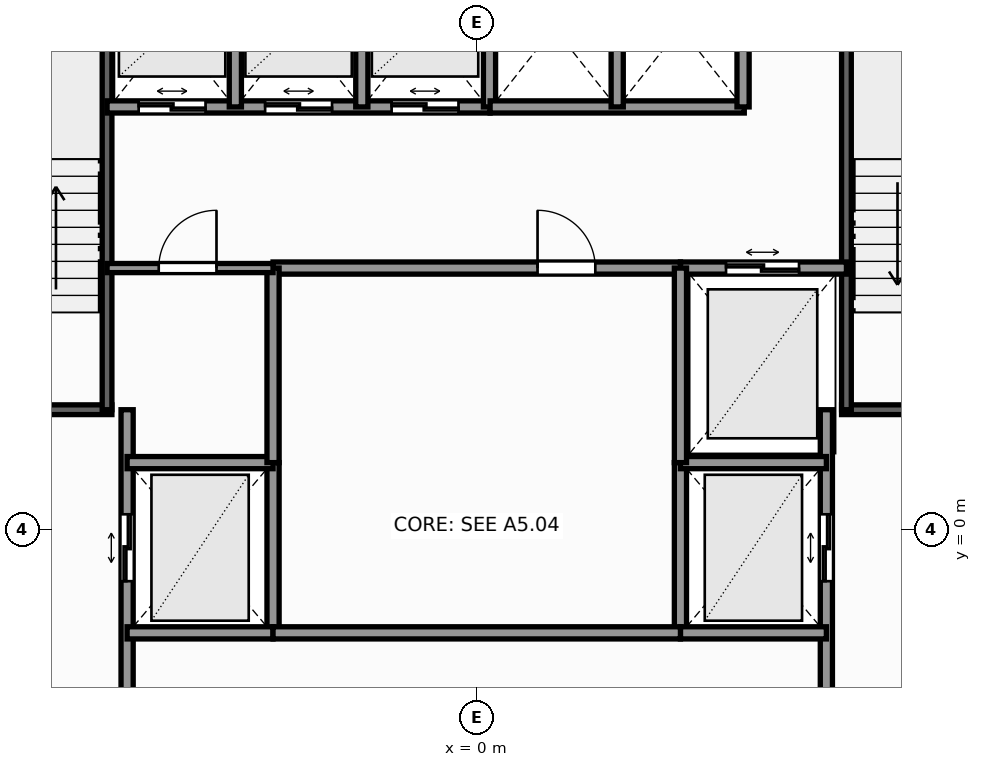
"""IFC4 building model, lengths in metres.
Left out: names, types, materials, properties, quantities, classifications, styles, units other than length and angle.
Written with IfcOpenShell. Run it as: python <this file> out.ifc"""

import sys

from ifc_helpers import new_model, si_unit, direction, frame, frame_2d, origin, place, context, subcontext, project, spatial, rectangle, extrude, element, fill, save


model = new_model("IFC4")
c1 = context("Model", 3, precision=1e-05, world=origin(), true_north=direction((0.0, 1.0)))
c2 = subcontext(c1, "Body", "Model", "MODEL_VIEW")
j1 = project(units=[si_unit("LENGTHUNIT", "METRE"), si_unit("PLANEANGLEUNIT", "RADIAN")], contexts=[c1])
p1 = place(None, origin())
s1 = spatial("IfcSite", under=j1, at=p1, CompositionType="ELEMENT")
p2 = place(p1, origin())
s2 = spatial("IfcBuilding", under=s1, at=p2, CompositionType="ELEMENT")
p3 = place(p2, frame((0.0, 0.0, 27.1)))
s3 = spatial("IfcBuildingStorey", under=s2, at=p3, CompositionType="ELEMENT", Elevation=27.1)
p4 = place(p3, frame((-9.52, 1.97, 0.0), z_axis=(0.0, 0.0, 1.0), x_axis=(1.0, 0.0, 0.0)))
e1 = element("IfcWall", 1, at=p4, inside=s3, PredefinedType="SHEAR", context=c2, shape_type="SweptSolid", body=[
    extrude(rectangle(XDim=3.52, YDim=0.16, at=frame_2d((1.76, 0.0))), origin(), (0.0, 0.0, 1.0), 3.3),
])
p5 = place(p4, frame((1.15, 0.0, 0.0)))
e2 = element("IfcOpeningElement", 2, at=p5, cuts=e1, PredefinedType="OPENING", context=c2, shape_type="SweptSolid", body=[
    extrude(rectangle(XDim=1.1, YDim=2.2, at=frame_2d((0.55, 1.1))), frame((0.0, 0.09, 0.0), z_axis=(0.0, -1.0, 0.0), x_axis=(1.0, 0.0, 0.0)), (0.0, 0.0, 1.0), 0.18),
])
p6 = place(p3, frame((-6.08, 1.97, 0.0), z_axis=(0.0, 0.0, 1.0), x_axis=(0.0, 1.0, 0.0)))
e3 = element("IfcWall", 3, at=p6, inside=s3, PredefinedType="SHEAR", context=c2, shape_type="SweptSolid", body=[
    extrude(rectangle(XDim=7.56, YDim=0.16, at=frame_2d((3.78, 0.0))), origin(), (0.0, 0.0, 1.0), 3.3),
])
p7 = place(p3, frame((6.0, 1.97, 0.0), z_axis=(0.0, 0.0, 1.0), x_axis=(1.0, 0.0, 0.0)))
e4 = element("IfcWall", 4, at=p7, inside=s3, PredefinedType="SHEAR", context=c2, shape_type="SweptSolid", body=[
    extrude(rectangle(XDim=3.52, YDim=0.16, at=frame_2d((1.76, 0.0))), origin(), (0.0, 0.0, 1.0), 3.3),
])
p8 = place(p7, frame((1.15, 0.0, 0.0)))
e5 = element("IfcOpeningElement", 5, at=p8, cuts=e4, PredefinedType="OPENING", context=c2, shape_type="SweptSolid", body=[
    extrude(rectangle(XDim=1.1, YDim=2.2, at=frame_2d((0.55, 1.1))), frame((0.0, 0.09, 0.0), z_axis=(0.0, -1.0, 0.0), x_axis=(1.0, 0.0, 0.0)), (0.0, 0.0, 1.0), 0.18),
])
p9 = place(p3, frame((6.08, 1.97, 0.0), z_axis=(0.0, 0.0, 1.0), x_axis=(0.0, 1.0, 0.0)))
e6 = element("IfcWall", 6, at=p9, inside=s3, PredefinedType="SHEAR", context=c2, shape_type="SweptSolid", body=[
    extrude(rectangle(XDim=7.56, YDim=0.16, at=frame_2d((3.78, 0.0))), origin(), (0.0, 0.0, 1.0), 3.3),
])
p10 = place(p3, frame((-5.75, -3.6, 0.0), z_axis=(0.0, 0.0, 1.0), x_axis=(0.0, 1.0, 0.0)))
e7 = element("IfcWall", 7, at=p10, inside=s3, PredefinedType="SOLIDWALL", context=c2, shape_type="SweptSolid", body=[
    extrude(rectangle(XDim=5.57, YDim=0.2, at=frame_2d((2.785, 0.0))), origin(), (0.0, 0.0, 1.0), 3.06),
])
p11 = place(p10, frame((2.75, 0.0, 0.0)))
e8 = element("IfcOpeningElement", 8, at=p11, cuts=e7, PredefinedType="OPENING", context=c2, shape_type="SweptSolid", body=[
    extrude(rectangle(XDim=1.1, YDim=2.2, at=frame_2d((0.55, 1.1))), frame((0.0, 0.11, 0.0), z_axis=(0.0, -1.0, 0.0), x_axis=(1.0, 0.0, 0.0)), (0.0, 0.0, 1.0), 0.22),
])
p12 = place(p3, frame((-3.35, -1.7, 0.0), z_axis=(0.0, 0.0, 1.0), x_axis=(0.0, 1.0, 0.0)))
e9 = element("IfcWall", 9, at=p12, inside=s3, PredefinedType="SOLIDWALL", context=c2, shape_type="SweptSolid", body=[
    extrude(rectangle(XDim=2.8, YDim=0.2, at=frame_2d((1.4, 0.0))), origin(), (0.0, 0.0, 1.0), 3.06),
])
for number, where, z_axis, x_axis in (
    (10, (-5.75, -1.7, 0.0), (0.0, 0.0, 1.0), (1.0, 0.0, 0.0)),
    (11, (-5.75, 1.1, 0.0), (0.0, 0.0, 1.0), (1.0, 0.0, 0.0)),
):
    element("IfcWall", number, at=place(p3, frame(where, z_axis=z_axis, x_axis=x_axis)), inside=s3, PredefinedType="SOLIDWALL", context=c2, shape_type="SweptSolid", body=[
        extrude(rectangle(XDim=2.4, YDim=0.2, at=frame_2d((1.2, 0.0))), origin(), (0.0, 0.0, 1.0), 3.06),
    ])
p13 = place(p3, frame((5.75, -3.6, 0.0), z_axis=(0.0, 0.0, 1.0), x_axis=(0.0, 1.0, 0.0)))
e12 = element("IfcWall", 12, at=p13, inside=s3, PredefinedType="SOLIDWALL", context=c2, shape_type="SweptSolid", body=[
    extrude(rectangle(XDim=5.57, YDim=0.2, at=frame_2d((2.785, 0.0))), origin(), (0.0, 0.0, 1.0), 3.06),
])
p14 = place(p13, frame((2.75, 0.0, 0.0)))
e13 = element("IfcOpeningElement", 13, at=p14, cuts=e12, PredefinedType="OPENING", context=c2, shape_type="SweptSolid", body=[
    extrude(rectangle(XDim=1.1, YDim=2.2, at=frame_2d((0.55, 1.1))), frame((0.0, 0.11, 0.0), z_axis=(0.0, -1.0, 0.0), x_axis=(1.0, 0.0, 0.0)), (0.0, 0.0, 1.0), 0.22),
])
p15 = place(p3, frame((3.35, -1.7, 0.0), z_axis=(0.0, 0.0, 1.0), x_axis=(0.0, 1.0, 0.0)))
e14 = element("IfcWall", 14, at=p15, inside=s3, PredefinedType="SOLIDWALL", context=c2, shape_type="SweptSolid", body=[
    extrude(rectangle(XDim=2.8, YDim=0.2, at=frame_2d((1.4, 0.0))), origin(), (0.0, 0.0, 1.0), 3.06),
])
for number, where, z_axis, x_axis in (
    (15, (3.35, -1.7, 0.0), (0.0, 0.0, 1.0), (1.0, 0.0, 0.0)),
    (16, (3.35, 1.1, 0.0), (0.0, 0.0, 1.0), (1.0, 0.0, 0.0)),
):
    element("IfcWall", number, at=place(p3, frame(where, z_axis=z_axis, x_axis=x_axis)), inside=s3, PredefinedType="SOLIDWALL", context=c2, shape_type="SweptSolid", body=[
        extrude(rectangle(XDim=2.4, YDim=0.2, at=frame_2d((1.2, 0.0))), origin(), (0.0, 0.0, 1.0), 3.06),
    ])
p16 = place(p3, frame((3.35, 4.3, 0.0), z_axis=(0.0, 0.0, 1.0), x_axis=(1.0, 0.0, 0.0)))
e17 = element("IfcWall", 17, at=p16, inside=s3, PredefinedType="SOLIDWALL", context=c2, shape_type="SweptSolid", body=[
    extrude(rectangle(XDim=2.73, YDim=0.2, at=frame_2d((1.365, 0.0))), origin(), (0.0, 0.0, 1.0), 3.06),
])
p17 = place(p16, frame((0.75, 0.0, 0.0)))
e18 = element("IfcOpeningElement", 18, at=p17, cuts=e17, PredefinedType="OPENING", context=c2, shape_type="SweptSolid", body=[
    extrude(rectangle(XDim=1.2, YDim=2.25, at=frame_2d((0.6, 1.125))), frame((0.0, 0.11, 0.0), z_axis=(0.0, -1.0, 0.0), x_axis=(1.0, 0.0, 0.0)), (0.0, 0.0, 1.0), 0.22),
])
p18 = place(p3, frame((-6.08, 6.95, 0.0), z_axis=(0.0, 0.0, 1.0), x_axis=(1.0, 0.0, 0.0)))
e19 = element("IfcWall", 19, at=p18, inside=s3, PredefinedType="SOLIDWALL", context=c2, shape_type="SweptSolid", body=[
    extrude(rectangle(XDim=6.3, YDim=0.2, at=frame_2d((3.15, 0.0))), origin(), (0.0, 0.0, 1.0), 3.06),
])
p19 = place(p18, frame((0.52, 0.0, 0.0)))
e20 = element("IfcOpeningElement", 20, at=p19, cuts=e19, PredefinedType="OPENING", context=c2, shape_type="SweptSolid", body=[
    extrude(rectangle(XDim=1.1, YDim=2.2, at=frame_2d((0.55, 1.1))), frame((0.0, 0.11, 0.0), z_axis=(0.0, -1.0, 0.0), x_axis=(1.0, 0.0, 0.0)), (0.0, 0.0, 1.0), 0.22),
])
p20 = place(p18, frame((2.6, 0.0, 0.0)))
e21 = element("IfcOpeningElement", 21, at=p20, cuts=e19, PredefinedType="OPENING", context=c2, shape_type="SweptSolid", body=[
    extrude(rectangle(XDim=1.1, YDim=2.2, at=frame_2d((0.55, 1.1))), frame((0.0, 0.11, 0.0), z_axis=(0.0, -1.0, 0.0), x_axis=(1.0, 0.0, 0.0)), (0.0, 0.0, 1.0), 0.22),
])
p21 = place(p18, frame((4.68, 0.0, 0.0)))
e22 = element("IfcOpeningElement", 22, at=p21, cuts=e19, PredefinedType="OPENING", context=c2, shape_type="SweptSolid", body=[
    extrude(rectangle(XDim=1.1, YDim=2.2, at=frame_2d((0.55, 1.1))), frame((0.0, 0.11, 0.0), z_axis=(0.0, -1.0, 0.0), x_axis=(1.0, 0.0, 0.0)), (0.0, 0.0, 1.0), 0.22),
])
for number, where, z_axis, x_axis in (
    (23, (-3.97, 6.95, 0.0), (0.0, 0.0, 1.0), (0.0, 1.0, 0.0)),
    (24, (-1.89, 6.95, 0.0), (0.0, 0.0, 1.0), (0.0, 1.0, 0.0)),
    (25, (0.21, 6.95, 0.0), (0.0, 0.0, 1.0), (0.0, 1.0, 0.0)),
):
    element("IfcWall", number, at=place(p3, frame(where, z_axis=z_axis, x_axis=x_axis)), inside=s3, PredefinedType="SOLIDWALL", context=c2, shape_type="SweptSolid", body=[
        extrude(rectangle(XDim=2.57, YDim=0.2, at=frame_2d((1.285, 0.0))), origin(), (0.0, 0.0, 1.0), 3.06),
    ])
p22 = place(p3, frame((0.22, 6.95, 0.0), z_axis=(0.0, 0.0, 1.0), x_axis=(1.0, 0.0, 0.0)))
e26 = element("IfcWall", 26, at=p22, inside=s3, PredefinedType="SOLIDWALL", context=c2, shape_type="SweptSolid", body=[
    extrude(rectangle(XDim=4.18, YDim=0.2, at=frame_2d((2.09, 0.0))), origin(), (0.0, 0.0, 1.0), 3.06),
])
for number, where, z_axis, x_axis in (
    (27, (4.38, 6.95, 0.0), (0.0, 0.0, 1.0), (0.0, 1.0, 0.0)),
    (28, (2.31, 6.95, 0.0), (0.0, 0.0, 1.0), (0.0, 1.0, 0.0)),
):
    element("IfcWall", number, at=place(p3, frame(where, z_axis=z_axis, x_axis=x_axis)), inside=s3, PredefinedType="SOLIDWALL", context=c2, shape_type="SweptSolid", body=[
        extrude(rectangle(XDim=2.57, YDim=0.2, at=frame_2d((1.285, 0.0))), origin(), (0.0, 0.0, 1.0), 3.06),
    ])
p23 = place(p3, frame((-3.35, 4.3, 0.0), z_axis=(0.0, 0.0, 1.0), x_axis=(1.0, 0.0, 0.0)))
e29 = element("IfcWall", 29, at=p23, inside=s3, PredefinedType="SOLIDWALL", context=c2, shape_type="SweptSolid", body=[
    extrude(rectangle(XDim=6.7, YDim=0.2, at=frame_2d((3.35, 0.0))), origin(), (0.0, 0.0, 1.0), 3.06),
])
p24 = place(p23, frame((4.35, 0.0, 0.0)))
e30 = element("IfcOpeningElement", 30, at=p24, cuts=e29, PredefinedType="OPENING", context=c2, shape_type="SweptSolid", body=[
    extrude(rectangle(XDim=0.95, YDim=2.06, at=frame_2d((0.475, 1.03))), frame((0.0, 0.11, 0.0), z_axis=(0.0, -1.0, 0.0), x_axis=(1.0, 0.0, 0.0)), (0.0, 0.0, 1.0), 0.22),
])
p25 = place(p3, frame((-3.35, -1.7, 0.0), z_axis=(0.0, 0.0, 1.0), x_axis=(1.0, 0.0, 0.0)))
e31 = element("IfcWall", 31, at=p25, inside=s3, PredefinedType="SOLIDWALL", context=c2, shape_type="SweptSolid", body=[
    extrude(rectangle(XDim=6.7, YDim=0.2, at=frame_2d((3.35, 0.0))), origin(), (0.0, 0.0, 1.0), 3.06),
])
for number, where, z_axis, x_axis in (
    (32, (-3.35, 1.1, 0.0), (0.0, 0.0, 1.0), (0.0, 1.0, 0.0)),
    (33, (3.35, 1.1, 0.0), (0.0, 0.0, 1.0), (0.0, 1.0, 0.0)),
):
    element("IfcWall", number, at=place(p3, frame(where, z_axis=z_axis, x_axis=x_axis)), inside=s3, PredefinedType="SOLIDWALL", context=c2, shape_type="SweptSolid", body=[
        extrude(rectangle(XDim=3.2, YDim=0.2, at=frame_2d((1.6, 0.0))), origin(), (0.0, 0.0, 1.0), 3.06),
    ])
p26 = place(p3, frame((-6.08, 4.3, 0.0), z_axis=(0.0, 0.0, 1.0), x_axis=(1.0, 0.0, 0.0)))
e34 = element("IfcWall", 34, at=p26, inside=s3, PredefinedType="PARTITIONING", context=c2, shape_type="SweptSolid", body=[
    extrude(rectangle(XDim=2.73, YDim=0.15, at=frame_2d((1.365, 0.0))), origin(), (0.0, 0.0, 1.0), 3.06),
])
p27 = place(p26, frame((0.85, 0.0, 0.0)))
e35 = element("IfcOpeningElement", 35, at=p27, cuts=e34, PredefinedType="OPENING", context=c2, shape_type="SweptSolid", body=[
    extrude(rectangle(XDim=0.95, YDim=2.06, at=frame_2d((0.475, 1.03))), frame((0.0, 0.085, 0.0), z_axis=(0.0, -1.0, 0.0), x_axis=(1.0, 0.0, 0.0)), (0.0, 0.0, 1.0), 0.17),
])
p28 = place(p11, origin())
e36 = element("IfcDoor", 36, at=p28, inside=s3, OperationType="DOUBLE_DOOR_SLIDING", PredefinedType="DOOR", context=c2, shape_type="SweptSolid", body=[
    extrude(rectangle(XDim=1.1, YDim=2.2, at=frame_2d((0.55, 1.1))), frame((0.0, 0.025, 0.0), z_axis=(0.0, -1.0, 0.0), x_axis=(1.0, 0.0, 0.0)), (0.0, 0.0, 1.0), 0.05),
])
fill(e8, e36)
p29 = place(p14, origin())
e37 = element("IfcDoor", 37, at=p29, inside=s3, OperationType="DOUBLE_DOOR_SLIDING", PredefinedType="DOOR", context=c2, shape_type="SweptSolid", body=[
    extrude(rectangle(XDim=1.1, YDim=2.2, at=frame_2d((0.55, 1.1))), frame((0.0, 0.025, 0.0), z_axis=(0.0, -1.0, 0.0), x_axis=(1.0, 0.0, 0.0)), (0.0, 0.0, 1.0), 0.05),
])
fill(e13, e37)
p30 = place(p17, origin())
e38 = element("IfcDoor", 38, at=p30, inside=s3, OperationType="DOUBLE_DOOR_SLIDING", PredefinedType="DOOR", context=c2, shape_type="SweptSolid", body=[
    extrude(rectangle(XDim=1.2, YDim=2.25, at=frame_2d((0.6, 1.125))), frame((0.0, 0.025, 0.0), z_axis=(0.0, -1.0, 0.0), x_axis=(1.0, 0.0, 0.0)), (0.0, 0.0, 1.0), 0.05),
])
fill(e18, e38)
p31 = place(p19, origin())
e39 = element("IfcDoor", 39, at=p31, inside=s3, OperationType="DOUBLE_DOOR_SLIDING", PredefinedType="DOOR", context=c2, shape_type="SweptSolid", body=[
    extrude(rectangle(XDim=1.1, YDim=2.2, at=frame_2d((0.55, 1.1))), frame((0.0, 0.025, 0.0), z_axis=(0.0, -1.0, 0.0), x_axis=(1.0, 0.0, 0.0)), (0.0, 0.0, 1.0), 0.05),
])
fill(e20, e39)
p32 = place(p20, origin())
e40 = element("IfcDoor", 40, at=p32, inside=s3, OperationType="DOUBLE_DOOR_SLIDING", PredefinedType="DOOR", context=c2, shape_type="SweptSolid", body=[
    extrude(rectangle(XDim=1.1, YDim=2.2, at=frame_2d((0.55, 1.1))), frame((0.0, 0.025, 0.0), z_axis=(0.0, -1.0, 0.0), x_axis=(1.0, 0.0, 0.0)), (0.0, 0.0, 1.0), 0.05),
])
fill(e21, e40)
p33 = place(p21, origin())
e41 = element("IfcDoor", 41, at=p33, inside=s3, OperationType="DOUBLE_DOOR_SLIDING", PredefinedType="DOOR", context=c2, shape_type="SweptSolid", body=[
    extrude(rectangle(XDim=1.1, YDim=2.2, at=frame_2d((0.55, 1.1))), frame((0.0, 0.025, 0.0), z_axis=(0.0, -1.0, 0.0), x_axis=(1.0, 0.0, 0.0)), (0.0, 0.0, 1.0), 0.05),
])
fill(e22, e41)
p34 = place(p24, origin())
e42 = element("IfcDoor", 42, at=p34, inside=s3, OperationType="SINGLE_SWING_LEFT", PredefinedType="DOOR", context=c2, shape_type="SweptSolid", body=[
    extrude(rectangle(XDim=0.95, YDim=2.06, at=frame_2d((0.475, 1.03))), frame((0.0, 0.025, 0.0), z_axis=(0.0, -1.0, 0.0), x_axis=(1.0, 0.0, 0.0)), (0.0, 0.0, 1.0), 0.05),
])
fill(e30, e42)
p35 = place(p27, origin())
e43 = element("IfcDoor", 43, at=p35, inside=s3, OperationType="SINGLE_SWING_RIGHT", PredefinedType="DOOR", context=c2, shape_type="SweptSolid", body=[
    extrude(rectangle(XDim=0.95, YDim=2.06, at=frame_2d((0.475, 1.03))), frame((0.0, 0.025, 0.0), z_axis=(0.0, -1.0, 0.0), x_axis=(1.0, 0.0, 0.0)), (0.0, 0.0, 1.0), 0.05),
])
fill(e35, e43)
save(model, sys.argv[1])
